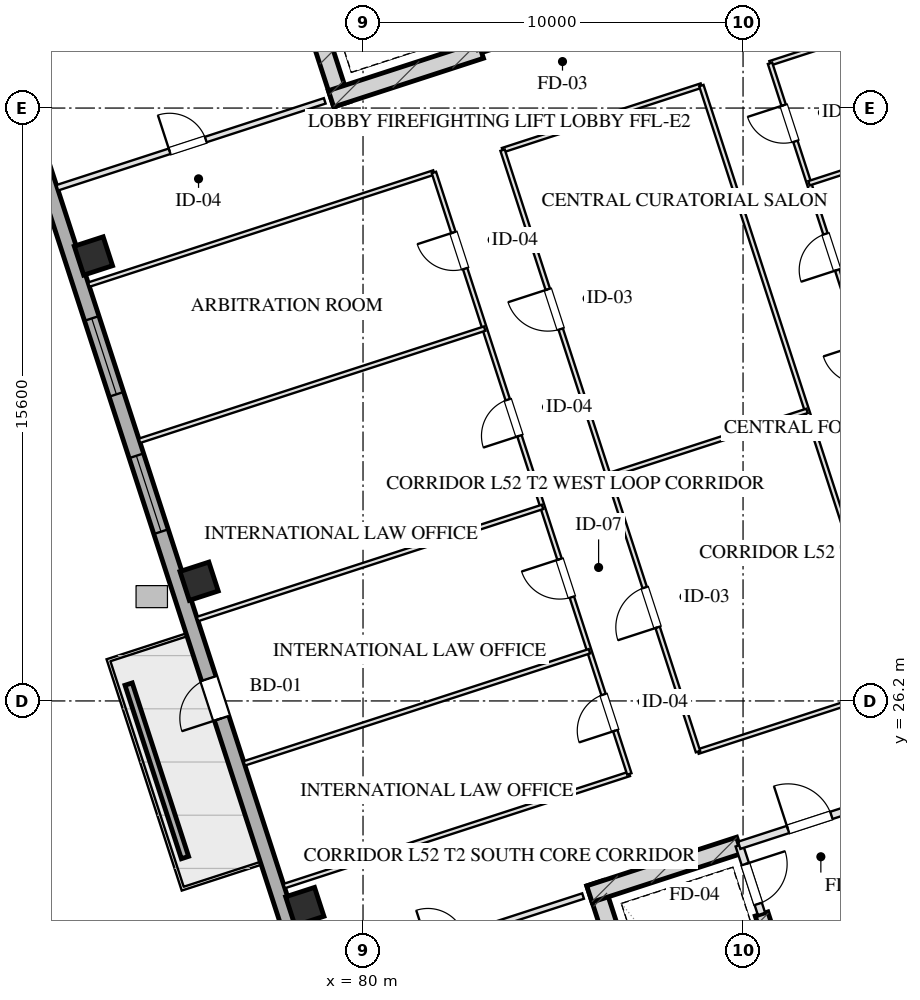
"""IFC4 building model, lengths in metres.
Left out: names, types, materials, properties, quantities, classifications, styles, units other than length and angle.
Written with IfcOpenShell. Run it as: python <this file> out.ifc"""

import sys

from ifc_helpers import new_model, si_unit, direction, frame, frame_2d, origin, origin_2d, place, context, subcontext, project, spatial, rectangle, hollow_rectangle, extrude, element, fill, save


model = new_model("IFC4")
c1 = context("Model", 3, precision=1e-05, world=origin(), true_north=direction((0.0, 1.0)))
c2 = subcontext(c1, "Body", "Model", "MODEL_VIEW")
j1 = project(units=[si_unit("LENGTHUNIT", "METRE"), si_unit("PLANEANGLEUNIT", "RADIAN")], contexts=[c1])
p1 = place(None, origin())
s1 = spatial("IfcSite", under=j1, at=p1, CompositionType="ELEMENT")
p2 = place(p1, origin())
s2 = spatial("IfcBuilding", under=s1, at=p2, CompositionType="ELEMENT")
p3 = place(p2, frame((0.0, 0.0, 195.5)))
s3 = spatial("IfcBuildingStorey", under=s2, at=p3, CompositionType="ELEMENT", Elevation=195.5)
p4 = place(p3, frame((86.102, 21.404, 0.0), z_axis=(0.0, 0.0, 1.0), x_axis=(0.309035778627, -0.951050412717, 0.0)))
e1 = element("IfcWall", 1, at=p4, inside=s3, PredefinedType="SHEAR", context=c2, shape_type="SweptSolid", body=[
    extrude(rectangle(XDim=9.33, YDim=0.45, at=frame_2d((4.665, 0.0))), origin(), (0.0, 0.0, 1.0), 3.45),
])
p5 = place(p3, frame((90.486, 20.594, 0.0), z_axis=(0.0, 0.0, 1.0), x_axis=(0.309020428229, -0.951055400562, 0.0)))
e2 = element("IfcWall", 2, at=p5, inside=s3, PredefinedType="SHEAR", context=c2, shape_type="SweptSolid", body=[
    extrude(rectangle(XDim=6.98, YDim=0.35, at=frame_2d((3.49, 0.0))), origin(), (0.0, 0.0, 1.0), 3.45),
])
p6 = place(p3, frame((85.957, 21.12, 0.0), z_axis=(0.0, 0.0, 1.0), x_axis=(0.951064796122, 0.308991510526, 0.0)))
e3 = element("IfcWall", 3, at=p6, inside=s3, PredefinedType="SHEAR", context=c2, shape_type="SweptSolid", body=[
    extrude(rectangle(XDim=4.145, YDim=0.45, at=frame_2d((2.073, 0.0))), origin(), (0.0, 0.0, 1.0), 3.45),
])
p7 = place(p3, frame((79.442, 41.899, 0.0), z_axis=(0.0, 0.0, 1.0), x_axis=(-0.309035778627, 0.951050412717, 0.0)))
e4 = element("IfcWall", 4, at=p7, inside=s3, PredefinedType="SHEAR", context=c2, shape_type="SweptSolid", body=[
    extrude(rectangle(XDim=9.33, YDim=0.45, at=frame_2d((4.665, 0.0))), origin(), (0.0, 0.0, 1.0), 3.45),
])
p8 = place(p3, frame((79.159, 42.043, 0.0), z_axis=(0.0, 0.0, 1.0), x_axis=(0.951047485828, 0.309044785913, 0.0)))
e5 = element("IfcWall", 5, at=p8, inside=s3, PredefinedType="SHEAR", context=c2, shape_type="SweptSolid", body=[
    extrude(rectangle(XDim=4.145, YDim=0.45, at=frame_2d((2.073, 0.0))), origin(), (0.0, 0.0, 1.0), 3.45),
])
for number, where, z_axis, x_axis in (
    (6, (78.468, 20.79, 0.0), (0.0, 0.0, 1.0), (0.951, 0.309, 0.0)),
    (7, (75.687, 29.349, 0.0), (0.0, 0.0, 1.0), (0.951, 0.309, 0.0)),
    (8, (72.906, 37.909, 0.0), (0.0, 0.0, 1.0), (0.951, 0.309, 0.0)),
):
    element("IfcColumn", number, at=place(p3, frame(where, z_axis=z_axis, x_axis=x_axis)), inside=s3, PredefinedType="COLUMN", context=c2, shape_type="SweptSolid", body=[
        extrude(hollow_rectangle(XDim=0.8, YDim=0.8, WallThickness=0.028, at=origin_2d()), origin(), (0.0, 0.0, 1.0), 3.451),
    ])
p9 = place(p3, frame((81.776, 8.827, 0.0), z_axis=(0.0, 0.0, 1.0), x_axis=(-0.309014228706, 0.951057414911, 0.0)))
e9 = element("IfcWall", 9, at=p9, inside=s3, PredefinedType="SOLIDWALL", context=c2, shape_type="SweptSolid", body=[
    extrude(rectangle(XDim=42.8, YDim=0.4, at=frame_2d((21.4, 0.0))), origin(), (0.0, 0.0, 1.0), 2.61),
])
p10 = place(p9, frame((22.95, 0.0, 0.75)))
e10 = element("IfcOpeningElement", 10, at=p10, cuts=e9, PredefinedType="OPENING", context=c2, shape_type="SweptSolid", body=[
    extrude(rectangle(XDim=2.1, YDim=1.46, at=frame_2d((1.05, 0.73))), frame((0.0, 0.21, 0.0), z_axis=(0.0, -1.0, 0.0), x_axis=(1.0, 0.0, 0.0)), (0.0, 0.0, 1.0), 0.42),
])
p11 = place(p9, frame((26.75, 0.0, 0.75)))
e11 = element("IfcOpeningElement", 11, at=p11, cuts=e9, PredefinedType="OPENING", context=c2, shape_type="SweptSolid", body=[
    extrude(rectangle(XDim=2.1, YDim=1.46, at=frame_2d((1.05, 0.73))), frame((0.0, 0.21, 0.0), z_axis=(0.0, -1.0, 0.0), x_axis=(1.0, 0.0, 0.0)), (0.0, 0.0, 1.0), 0.42),
])
p12 = place(p9, frame((17.787, 0.0, 0.0)))
e12 = element("IfcOpeningElement", 12, at=p12, cuts=e9, PredefinedType="OPENING", context=c2, shape_type="SweptSolid", body=[
    extrude(rectangle(XDim=1.1, YDim=2.15, at=frame_2d((0.55, 1.075))), frame((0.0, 0.21, 0.0), z_axis=(0.0, -1.0, 0.0), x_axis=(1.0, 0.0, 0.0)), (0.0, 0.0, 1.0), 0.42),
])
p13 = place(p3, frame((75.315, 22.079, 0.0), z_axis=(0.0, 0.0, 1.0), x_axis=(-0.309032019345, 0.951051634255, 0.0)))
e13 = element("IfcWall", 13, at=p13, inside=s3, PredefinedType="PARAPET", context=c2, shape_type="SweptSolid", body=[
    extrude(rectangle(XDim=4.8, YDim=0.2, at=frame_2d((2.4, 0.0))), origin(), (0.0, 0.0, 1.0), 0.75),
])
p14 = place(p3, frame((89.899, 22.401, 0.0), z_axis=(0.0, 0.0, 1.0), x_axis=(0.308932062672, -0.951084108086, 0.0)))
e14 = element("IfcWall", 14, at=p14, inside=s3, PredefinedType="PARTITIONING", context=c2, shape_type="SweptSolid", body=[
    extrude(rectangle(XDim=1.9, YDim=0.2, at=frame_2d((0.95, 0.0))), origin(), (0.0, 0.0, 1.0), 3.175),
])
p15 = place(p14, frame((0.52, 0.0, 0.0)))
e15 = element("IfcOpeningElement", 15, at=p15, cuts=e14, PredefinedType="OPENING", context=c2, shape_type="SweptSolid", body=[
    extrude(rectangle(XDim=1.1, YDim=2.05, at=frame_2d((0.55, 1.025))), frame((0.0, 0.11, 0.0), z_axis=(0.0, -1.0, 0.0), x_axis=(1.0, 0.0, 0.0)), (0.0, 0.0, 1.0), 0.22),
])
p16 = place(p3, frame((89.899, 22.401, 0.0), z_axis=(0.0, 0.0, 1.0), x_axis=(0.951046716504, 0.309047153403, 0.0)))
e16 = element("IfcWall", 16, at=p16, inside=s3, PredefinedType="PARTITIONING", context=c2, shape_type="SweptSolid", body=[
    extrude(rectangle(XDim=3.83, YDim=0.2, at=frame_2d((1.915, 0.0))), origin(), (0.0, 0.0, 1.0), 3.175),
])
p17 = place(p16, frame((1.35, 0.0, 0.0)))
e17 = element("IfcOpeningElement", 17, at=p17, cuts=e16, PredefinedType="OPENING", context=c2, shape_type="SweptSolid", body=[
    extrude(rectangle(XDim=1.2, YDim=2.05, at=frame_2d((0.6, 1.025))), frame((0.0, 0.11, 0.0), z_axis=(0.0, -1.0, 0.0), x_axis=(1.0, 0.0, 0.0)), (0.0, 0.0, 1.0), 0.22),
])
p18 = place(p3, frame((83.101, 43.324, 0.0), z_axis=(0.0, 0.0, 1.0), x_axis=(0.951052804469, 0.309028417967, 0.0)))
e18 = element("IfcWall", 18, at=p18, inside=s3, PredefinedType="PARTITIONING", context=c2, shape_type="SweptSolid", body=[
    extrude(rectangle(XDim=3.83, YDim=0.2, at=frame_2d((1.915, 0.0))), origin(), (0.0, 0.0, 1.0), 3.175),
])
p19 = place(p18, frame((1.35, 0.0, 0.0)))
e19 = element("IfcOpeningElement", 19, at=p19, cuts=e18, PredefinedType="OPENING", context=c2, shape_type="SweptSolid", body=[
    extrude(rectangle(XDim=1.2, YDim=2.05, at=frame_2d((0.6, 1.025))), frame((0.0, 0.11, 0.0), z_axis=(0.0, -1.0, 0.0), x_axis=(1.0, 0.0, 0.0)), (0.0, 0.0, 1.0), 0.22),
])
p20 = place(p3, frame((78.753, 18.78, 0.0), z_axis=(0.0, 0.0, 1.0), x_axis=(0.951060977215, 0.309003264738, 0.0)))
e20 = element("IfcWall", 20, at=p20, inside=s3, PredefinedType="PARTITIONING", context=c2, shape_type="SweptSolid", body=[
    extrude(rectangle(XDim=7.4, YDim=0.15, at=frame_2d((3.7, 0.0))), origin(), (0.0, 0.0, 1.0), 2.15),
])
p21 = place(p20, frame((3.108, 0.0, 0.0)))
e21 = element("IfcOpeningElement", 21, at=p21, cuts=e20, PredefinedType="OPENING", context=c2, shape_type="SweptSolid", body=[
    extrude(rectangle(XDim=1.0, YDim=2.05, at=frame_2d((0.5, 1.025))), frame((0.0, 0.085, 0.0), z_axis=(0.0, -1.0, 0.0), x_axis=(1.0, 0.0, 0.0)), (0.0, 0.0, 1.0), 0.17),
])
p22 = place(p3, frame((71.955, 39.703, 0.0), z_axis=(0.0, 0.0, 1.0), x_axis=(0.951060977215, 0.309003264738, 0.0)))
e22 = element("IfcWall", 22, at=p22, inside=s3, PredefinedType="PARTITIONING", context=c2, shape_type="SweptSolid", body=[
    extrude(rectangle(XDim=7.4, YDim=0.15, at=frame_2d((3.7, 0.0))), origin(), (0.0, 0.0, 1.0), 2.15),
])
p23 = place(p22, frame((3.108, 0.0, 0.0)))
e23 = element("IfcOpeningElement", 23, at=p23, cuts=e22, PredefinedType="OPENING", context=c2, shape_type="SweptSolid", body=[
    extrude(rectangle(XDim=1.0, YDim=2.05, at=frame_2d((0.5, 1.025))), frame((0.0, 0.085, 0.0), z_axis=(0.0, -1.0, 0.0), x_axis=(1.0, 0.0, 0.0)), (0.0, 0.0, 1.0), 0.17),
])
p24 = place(p3, frame((77.925, 21.328, 0.0), z_axis=(0.0, 0.0, 1.0), x_axis=(0.951053980838, 0.309024797601, 0.0)))
e24 = element("IfcWall", 24, at=p24, inside=s3, PredefinedType="PARTITIONING", context=c2, shape_type="SweptSolid", body=[
    extrude(rectangle(XDim=9.55, YDim=0.12, at=frame_2d((4.775, 0.0))), origin(), (0.0, 0.0, 1.0), 3.175),
])
p25 = place(p3, frame((88.814, 24.867, 0.0), z_axis=(0.0, 0.0, 1.0), x_axis=(0.951061793147, 0.309000753423, 0.0)))
e25 = element("IfcWall", 25, at=p25, inside=s3, PredefinedType="PARTITIONING", context=c2, shape_type="SweptSolid", body=[
    extrude(rectangle(XDim=5.5, YDim=0.12, at=frame_2d((2.75, 0.0))), origin(), (0.0, 0.0, 1.0), 3.175),
])
p26 = place(p3, frame((72.783, 37.154, 0.0), z_axis=(0.0, 0.0, 1.0), x_axis=(0.951053980838, 0.309024797601, 0.0)))
e26 = element("IfcWall", 26, at=p26, inside=s3, PredefinedType="PARTITIONING", context=c2, shape_type="SweptSolid", body=[
    extrude(rectangle(XDim=9.55, YDim=0.12, at=frame_2d((4.775, 0.0))), origin(), (0.0, 0.0, 1.0), 3.175),
])
p27 = place(p3, frame((83.672, 40.692, 0.0), z_axis=(0.0, 0.0, 1.0), x_axis=(0.951048747115, 0.30904090443, 0.0)))
e27 = element("IfcWall", 27, at=p27, inside=s3, PredefinedType="PARTITIONING", context=c2, shape_type="SweptSolid", body=[
    extrude(rectangle(XDim=5.5, YDim=0.12, at=frame_2d((2.75, 0.0))), origin(), (0.0, 0.0, 1.0), 3.175),
])
p28 = place(p3, frame((90.71, 42.979, 0.0), z_axis=(0.0, 0.0, 1.0), x_axis=(0.95105853842, 0.309010770845, 0.0)))
e28 = element("IfcWall", 28, at=p28, inside=s3, PredefinedType="PARTITIONING", context=c2, shape_type="SweptSolid", body=[
    extrude(rectangle(XDim=11.95, YDim=0.12, at=frame_2d((5.975, 0.0))), origin(), (0.0, 0.0, 1.0), 3.175),
])
p29 = place(p3, frame((87.007, 24.28, 0.0), z_axis=(0.0, 0.0, 1.0), x_axis=(-0.309022042254, 0.951054876125, 0.0)))
e29 = element("IfcWall", 29, at=p29, inside=s3, PredefinedType="PARTITIONING", context=c2, shape_type="SweptSolid", body=[
    extrude(rectangle(XDim=16.64, YDim=0.12, at=frame_2d((8.32, 0.0))), origin(), (0.0, 0.0, 1.0), 3.175),
])
p30 = place(p29, frame((1.197, 0.0, 0.0)))
e30 = element("IfcOpeningElement", 30, at=p30, cuts=e29, PredefinedType="OPENING", context=c2, shape_type="SweptSolid", body=[
    extrude(rectangle(XDim=1.0, YDim=2.05, at=frame_2d((0.5, 1.025))), frame((0.0, 0.07, 0.0), z_axis=(0.0, -1.0, 0.0), x_axis=(1.0, 0.0, 0.0)), (0.0, 0.0, 1.0), 0.14),
])
p31 = place(p29, frame((4.891, 0.0, 0.0)))
e31 = element("IfcOpeningElement", 31, at=p31, cuts=e29, PredefinedType="OPENING", context=c2, shape_type="SweptSolid", body=[
    extrude(rectangle(XDim=1.05, YDim=2.05, at=frame_2d((0.525, 1.025))), frame((0.0, 0.07, 0.0), z_axis=(0.0, -1.0, 0.0), x_axis=(1.0, 0.0, 0.0)), (0.0, 0.0, 1.0), 0.14),
])
p32 = place(p29, frame((9.354, 0.0, 0.0)))
e32 = element("IfcOpeningElement", 32, at=p32, cuts=e29, PredefinedType="OPENING", context=c2, shape_type="SweptSolid", body=[
    extrude(rectangle(XDim=1.0, YDim=2.05, at=frame_2d((0.5, 1.025))), frame((0.0, 0.07, 0.0), z_axis=(0.0, -1.0, 0.0), x_axis=(1.0, 0.0, 0.0)), (0.0, 0.0, 1.0), 0.14),
])
p33 = place(p29, frame((13.98, 0.0, 0.0)))
e33 = element("IfcOpeningElement", 33, at=p33, cuts=e29, PredefinedType="OPENING", context=c2, shape_type="SweptSolid", body=[
    extrude(rectangle(XDim=1.0, YDim=2.05, at=frame_2d((0.5, 1.025))), frame((0.0, 0.07, 0.0), z_axis=(0.0, -1.0, 0.0), x_axis=(1.0, 0.0, 0.0)), (0.0, 0.0, 1.0), 0.14),
])
p34 = place(p3, frame((88.814, 24.867, 0.0), z_axis=(0.0, 0.0, 1.0), x_axis=(-0.309022042254, 0.951054876125, 0.0)))
e34 = element("IfcWall", 34, at=p34, inside=s3, PredefinedType="PARTITIONING", context=c2, shape_type="SweptSolid", body=[
    extrude(rectangle(XDim=16.64, YDim=0.12, at=frame_2d((8.32, 0.0))), origin(), (0.0, 0.0, 1.0), 3.175),
])
p35 = place(p34, frame((3.438, 0.0, 0.0)))
e35 = element("IfcOpeningElement", 35, at=p35, cuts=e34, PredefinedType="OPENING", context=c2, shape_type="SweptSolid", body=[
    extrude(rectangle(XDim=1.1, YDim=2.05, at=frame_2d((0.55, 1.025))), frame((0.0, 0.07, 0.0), z_axis=(0.0, -1.0, 0.0), x_axis=(1.0, 0.0, 0.0)), (0.0, 0.0, 1.0), 0.14),
])
p36 = place(p34, frame((11.69, 0.0, 0.0)))
e36 = element("IfcOpeningElement", 36, at=p36, cuts=e34, PredefinedType="OPENING", context=c2, shape_type="SweptSolid", body=[
    extrude(rectangle(XDim=1.1, YDim=2.05, at=frame_2d((0.55, 1.025))), frame((0.0, 0.07, 0.0), z_axis=(0.0, -1.0, 0.0), x_axis=(1.0, 0.0, 0.0)), (0.0, 0.0, 1.0), 0.14),
])
p37 = place(p3, frame((94.045, 26.566, 0.0), z_axis=(0.0, 0.0, 1.0), x_axis=(-0.30901773025, 0.951056277195, 0.0)))
e37 = element("IfcWall", 37, at=p37, inside=s3, PredefinedType="PARTITIONING", context=c2, shape_type="SweptSolid", body=[
    extrude(rectangle(XDim=16.64, YDim=0.12, at=frame_2d((8.32, 0.0))), origin(), (0.0, 0.0, 1.0), 3.175),
])
p38 = place(p3, frame((95.852, 27.153, 0.0), z_axis=(0.0, 0.0, 1.0), x_axis=(-0.309004459387, 0.951060589068, 0.0)))
e38 = element("IfcWall", 38, at=p38, inside=s3, PredefinedType="PARTITIONING", context=c2, shape_type="SweptSolid", body=[
    extrude(rectangle(XDim=16.64, YDim=0.12, at=frame_2d((8.32, 0.0))), origin(), (0.0, 0.0, 1.0), 3.175),
])
p39 = place(p38, frame((1.16, 0.0, 0.0)))
e39 = element("IfcOpeningElement", 39, at=p39, cuts=e38, PredefinedType="OPENING", context=c2, shape_type="SweptSolid", body=[
    extrude(rectangle(XDim=1.0, YDim=2.05, at=frame_2d((0.5, 1.025))), frame((0.0, 0.07, 0.0), z_axis=(0.0, -1.0, 0.0), x_axis=(1.0, 0.0, 0.0)), (0.0, 0.0, 1.0), 0.14),
])
p40 = place(p38, frame((4.72, 0.0, 0.0)))
e40 = element("IfcOpeningElement", 40, at=p40, cuts=e38, PredefinedType="OPENING", context=c2, shape_type="SweptSolid", body=[
    extrude(rectangle(XDim=1.0, YDim=2.05, at=frame_2d((0.5, 1.025))), frame((0.0, 0.07, 0.0), z_axis=(0.0, -1.0, 0.0), x_axis=(1.0, 0.0, 0.0)), (0.0, 0.0, 1.0), 0.14),
])
p41 = place(p38, frame((7.82, 0.0, 0.0)))
e41 = element("IfcOpeningElement", 41, at=p41, cuts=e38, PredefinedType="OPENING", context=c2, shape_type="SweptSolid", body=[
    extrude(rectangle(XDim=1.05, YDim=2.05, at=frame_2d((0.525, 1.025))), frame((0.0, 0.07, 0.0), z_axis=(0.0, -1.0, 0.0), x_axis=(1.0, 0.0, 0.0)), (0.0, 0.0, 1.0), 0.14),
])
p42 = place(p38, frame((10.92, 0.0, 0.0)))
e42 = element("IfcOpeningElement", 42, at=p42, cuts=e38, PredefinedType="OPENING", context=c2, shape_type="SweptSolid", body=[
    extrude(rectangle(XDim=1.0, YDim=2.05, at=frame_2d((0.5, 1.025))), frame((0.0, 0.07, 0.0), z_axis=(0.0, -1.0, 0.0), x_axis=(1.0, 0.0, 0.0)), (0.0, 0.0, 1.0), 0.14),
])
p43 = place(p38, frame((14.48, 0.0, 0.0)))
e43 = element("IfcOpeningElement", 43, at=p43, cuts=e38, PredefinedType="OPENING", context=c2, shape_type="SweptSolid", body=[
    extrude(rectangle(XDim=1.0, YDim=2.05, at=frame_2d((0.5, 1.025))), frame((0.0, 0.07, 0.0), z_axis=(0.0, -1.0, 0.0), x_axis=(1.0, 0.0, 0.0)), (0.0, 0.0, 1.0), 0.14),
])
p44 = place(p3, frame((86.453, 32.133, 0.0), z_axis=(0.0, 0.0, 1.0), x_axis=(0.951052986339, 0.309027858251, 0.0)))
e44 = element("IfcWall", 44, at=p44, inside=s3, PredefinedType="PARTITIONING", context=c2, shape_type="SweptSolid", body=[
    extrude(rectangle(XDim=5.5, YDim=0.12, at=frame_2d((2.75, 0.0))), origin(), (0.0, 0.0, 1.0), 3.175),
])
p45 = place(p3, frame((76.876, 24.557, 0.0), z_axis=(0.0, 0.0, 1.0), x_axis=(0.951056422073, 0.309017284359, 0.0)))
e45 = element("IfcWall", 45, at=p45, inside=s3, PredefinedType="PARTITIONING", context=c2, shape_type="SweptSolid", body=[
    extrude(rectangle(XDim=9.55, YDim=0.12, at=frame_2d((4.775, 0.0))), origin(), (0.0, 0.0, 1.0), 3.175),
])
for number, where, z_axis, x_axis in (
    (46, (75.642, 28.355, 0.0), (0.0, 0.0, 1.0), (0.951, 0.309, 0.0)),
    (47, (74.118, 33.045, 0.0), (0.0, 0.0, 1.0), (0.951, 0.309, 0.0)),
):
    element("IfcWall", number, at=place(p3, frame(where, z_axis=z_axis, x_axis=x_axis)), inside=s3, PredefinedType="PARTITIONING", context=c2, shape_type="SweptSolid", body=[
        extrude(rectangle(XDim=9.55, YDim=0.12, at=frame_2d((4.775, 0.0))), origin(), (0.0, 0.0, 1.0), 3.175),
    ])
p46 = place(p3, frame((91.736, 39.821, 0.0), z_axis=(0.0, 0.0, 1.0), x_axis=(0.951052534024, 0.309029250277, 0.0)))
e48 = element("IfcWall", 48, at=p46, inside=s3, PredefinedType="PARTITIONING", context=c2, shape_type="SweptSolid", body=[
    extrude(rectangle(XDim=11.95, YDim=0.12, at=frame_2d((5.975, 0.0))), origin(), (0.0, 0.0, 1.0), 3.175),
])
p47 = place(p10, origin())
e49 = element("IfcWindow", 49, at=p47, inside=s3, PartitioningType="TRIPLE_PANEL_VERTICAL", PredefinedType="WINDOW", context=c2, shape_type="SweptSolid", body=[
    extrude(rectangle(XDim=2.1, YDim=1.46, at=frame_2d((1.05, 0.73))), frame((0.0, 0.03, 0.0), z_axis=(0.0, -1.0, 0.0), x_axis=(1.0, 0.0, 0.0)), (0.0, 0.0, 1.0), 0.06),
])
fill(e10, e49)
p48 = place(p11, origin())
e50 = element("IfcWindow", 50, at=p48, inside=s3, PartitioningType="TRIPLE_PANEL_VERTICAL", PredefinedType="WINDOW", context=c2, shape_type="SweptSolid", body=[
    extrude(rectangle(XDim=2.1, YDim=1.46, at=frame_2d((1.05, 0.73))), frame((0.0, 0.03, 0.0), z_axis=(0.0, -1.0, 0.0), x_axis=(1.0, 0.0, 0.0)), (0.0, 0.0, 1.0), 0.06),
])
fill(e11, e50)
p49 = place(p12, origin())
e51 = element("IfcDoor", 51, at=p49, inside=s3, OperationType="SINGLE_SWING_LEFT", PredefinedType="DOOR", context=c2, shape_type="SweptSolid", body=[
    extrude(rectangle(XDim=1.1, YDim=2.15, at=frame_2d((0.55, 1.075))), frame((0.0, 0.025, 0.0), z_axis=(0.0, -1.0, 0.0), x_axis=(1.0, 0.0, 0.0)), (0.0, 0.0, 1.0), 0.05),
])
fill(e12, e51)
p50 = place(p15, origin())
e52 = element("IfcDoor", 52, at=p50, inside=s3, OperationType="SINGLE_SWING_LEFT", PredefinedType="DOOR", context=c2, shape_type="SweptSolid", body=[
    extrude(rectangle(XDim=1.1, YDim=2.05, at=frame_2d((0.55, 1.025))), frame((0.0, 0.025, 0.0), z_axis=(0.0, -1.0, 0.0), x_axis=(1.0, 0.0, 0.0)), (0.0, 0.0, 1.0), 0.05),
])
fill(e15, e52)
p51 = place(p17, origin())
e53 = element("IfcDoor", 53, at=p51, inside=s3, OperationType="SINGLE_SWING_LEFT", PredefinedType="DOOR", context=c2, shape_type="SweptSolid", body=[
    extrude(rectangle(XDim=1.2, YDim=2.05, at=frame_2d((0.6, 1.025))), frame((0.0, 0.025, 0.0), z_axis=(0.0, -1.0, 0.0), x_axis=(1.0, 0.0, 0.0)), (0.0, 0.0, 1.0), 0.05),
])
fill(e17, e53)
p52 = place(p23, origin())
e54 = element("IfcDoor", 54, at=p52, inside=s3, OperationType="SINGLE_SWING_LEFT", PredefinedType="DOOR", context=c2, shape_type="SweptSolid", body=[
    extrude(rectangle(XDim=1.0, YDim=2.05, at=frame_2d((0.5, 1.025))), frame((0.0, 0.025, 0.0), z_axis=(0.0, -1.0, 0.0), x_axis=(1.0, 0.0, 0.0)), (0.0, 0.0, 1.0), 0.05),
])
fill(e23, e54)
p53 = place(p30, origin())
e55 = element("IfcDoor", 55, at=p53, inside=s3, OperationType="SINGLE_SWING_LEFT", PredefinedType="DOOR", context=c2, shape_type="SweptSolid", body=[
    extrude(rectangle(XDim=1.0, YDim=2.05, at=frame_2d((0.5, 1.025))), frame((0.0, 0.025, 0.0), z_axis=(0.0, -1.0, 0.0), x_axis=(1.0, 0.0, 0.0)), (0.0, 0.0, 1.0), 0.05),
])
fill(e30, e55)
p54 = place(p31, origin())
e56 = element("IfcDoor", 56, at=p54, inside=s3, OperationType="SINGLE_SWING_RIGHT", PredefinedType="DOOR", context=c2, shape_type="SweptSolid", body=[
    extrude(rectangle(XDim=1.05, YDim=2.05, at=frame_2d((0.525, 1.025))), frame((0.0, 0.025, 0.0), z_axis=(0.0, -1.0, 0.0), x_axis=(1.0, 0.0, 0.0)), (0.0, 0.0, 1.0), 0.05),
])
fill(e31, e56)
p55 = place(p32, origin())
e57 = element("IfcDoor", 57, at=p55, inside=s3, OperationType="SINGLE_SWING_LEFT", PredefinedType="DOOR", context=c2, shape_type="SweptSolid", body=[
    extrude(rectangle(XDim=1.0, YDim=2.05, at=frame_2d((0.5, 1.025))), frame((0.0, 0.025, 0.0), z_axis=(0.0, -1.0, 0.0), x_axis=(1.0, 0.0, 0.0)), (0.0, 0.0, 1.0), 0.05),
])
fill(e32, e57)
p56 = place(p33, origin())
e58 = element("IfcDoor", 58, at=p56, inside=s3, OperationType="SINGLE_SWING_RIGHT", PredefinedType="DOOR", context=c2, shape_type="SweptSolid", body=[
    extrude(rectangle(XDim=1.0, YDim=2.05, at=frame_2d((0.5, 1.025))), frame((0.0, 0.025, 0.0), z_axis=(0.0, -1.0, 0.0), x_axis=(1.0, 0.0, 0.0)), (0.0, 0.0, 1.0), 0.05),
])
fill(e33, e58)
p57 = place(p35, origin())
e59 = element("IfcDoor", 59, at=p57, inside=s3, OperationType="SINGLE_SWING_LEFT", PredefinedType="DOOR", context=c2, shape_type="SweptSolid", body=[
    extrude(rectangle(XDim=1.1, YDim=2.05, at=frame_2d((0.55, 1.025))), frame((0.0, 0.025, 0.0), z_axis=(0.0, -1.0, 0.0), x_axis=(1.0, 0.0, 0.0)), (0.0, 0.0, 1.0), 0.05),
])
fill(e35, e59)
p58 = place(p36, origin())
e60 = element("IfcDoor", 60, at=p58, inside=s3, OperationType="SINGLE_SWING_RIGHT", PredefinedType="DOOR", context=c2, shape_type="SweptSolid", body=[
    extrude(rectangle(XDim=1.1, YDim=2.05, at=frame_2d((0.55, 1.025))), frame((0.0, 0.025, 0.0), z_axis=(0.0, -1.0, 0.0), x_axis=(1.0, 0.0, 0.0)), (0.0, 0.0, 1.0), 0.05),
])
fill(e36, e60)
p59 = place(p42, origin())
e61 = element("IfcDoor", 61, at=p59, inside=s3, OperationType="SINGLE_SWING_LEFT", PredefinedType="DOOR", context=c2, shape_type="SweptSolid", body=[
    extrude(rectangle(XDim=1.0, YDim=2.05, at=frame_2d((0.5, 1.025))), frame((0.0, 0.025, 0.0), z_axis=(0.0, -1.0, 0.0), x_axis=(1.0, 0.0, 0.0)), (0.0, 0.0, 1.0), 0.05),
])
fill(e42, e61)
p60 = place(p43, origin())
e62 = element("IfcDoor", 62, at=p60, inside=s3, OperationType="SINGLE_SWING_RIGHT", PredefinedType="DOOR", context=c2, shape_type="SweptSolid", body=[
    extrude(rectangle(XDim=1.0, YDim=2.05, at=frame_2d((0.5, 1.025))), frame((0.0, 0.025, 0.0), z_axis=(0.0, -1.0, 0.0), x_axis=(1.0, 0.0, 0.0)), (0.0, 0.0, 1.0), 0.05),
])
fill(e43, e62)
save(model, sys.argv[1])
